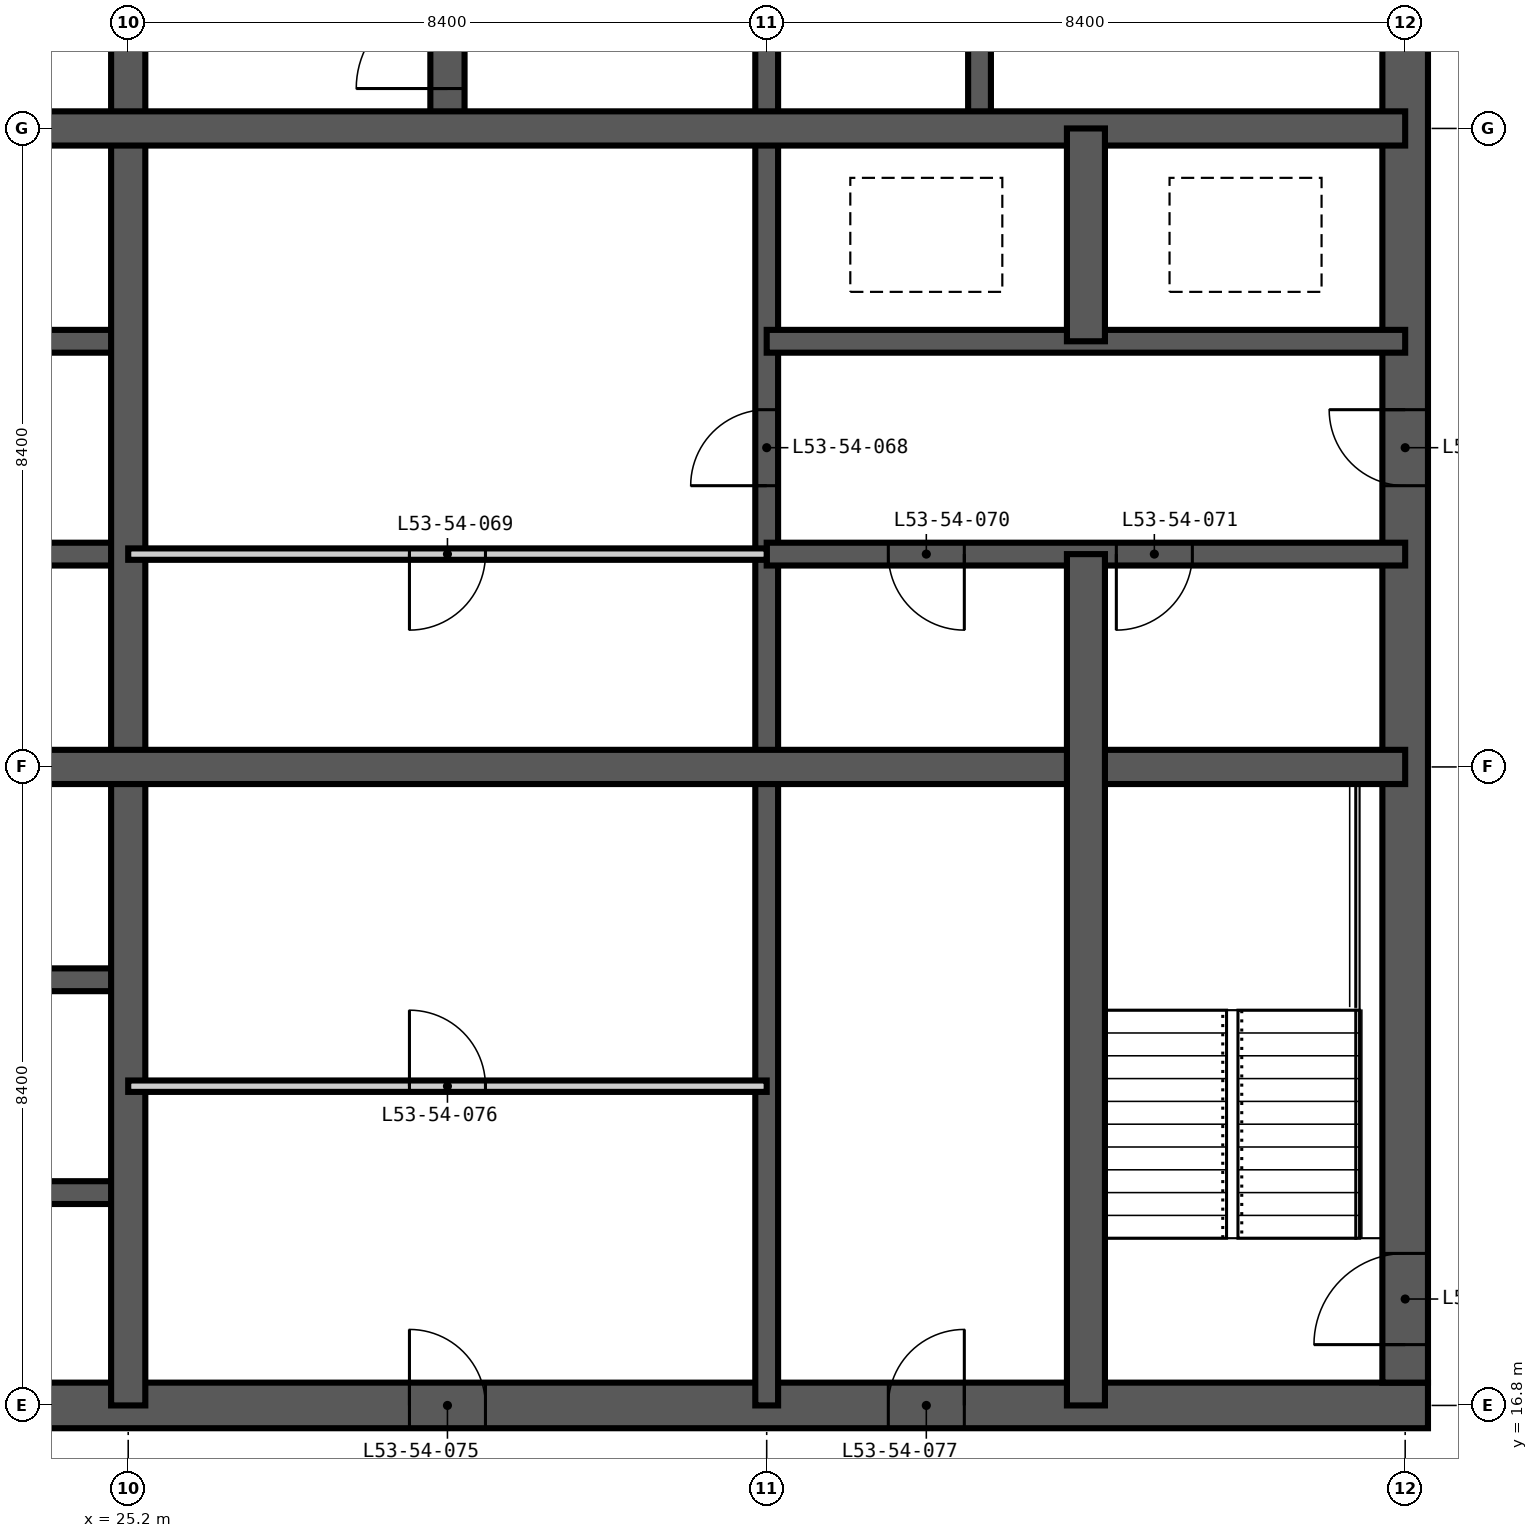
"""IFC4 building model, lengths in metres.
Left out: names, types, materials, properties, quantities, classifications, styles, units other than length and angle.
Written with IfcOpenShell. Run it as: python <this file> out.ifc"""

import sys

from ifc_helpers import new_model, si_unit, direction, frame, frame_2d, origin, place, context, subcontext, project, spatial, rectangle, extrude, element, fill, save


model = new_model("IFC4")
c1 = context("Model", 3, precision=1e-05, world=origin(), true_north=direction((0.0, 1.0)))
c2 = subcontext(c1, "Body", "Model", "MODEL_VIEW")
j1 = project(units=[si_unit("LENGTHUNIT", "METRE"), si_unit("PLANEANGLEUNIT", "RADIAN")], contexts=[c1])
p1 = place(None, origin())
s1 = spatial("IfcSite", under=j1, at=p1, CompositionType="ELEMENT")
p2 = place(p1, origin())
s2 = spatial("IfcBuilding", under=s1, at=p2, CompositionType="ELEMENT")
p3 = place(p2, frame((0.0, 0.0, 205.8)))
s3 = spatial("IfcBuildingStorey", under=s2, at=p3, CompositionType="ELEMENT", Elevation=205.8)
p4 = place(p3, frame((16.5, 16.8, -0.35), z_axis=(0.0, 0.0, 1.0), x_axis=(1.0, 0.0, 0.0)))
e1 = element("IfcWall", 1, at=p4, inside=s3, PredefinedType="SHEAR", context=c2, shape_type="SweptSolid", body=[
    extrude(rectangle(XDim=25.8, YDim=0.6, at=frame_2d((12.9, 0.0))), origin(), (0.0, 0.0, 1.0), 3.6),
])
p5 = place(p4, frame((12.4, 0.0, 0.35)))
e2 = element("IfcOpeningElement", 2, at=p5, cuts=e1, PredefinedType="OPENING", context=c2, shape_type="SweptSolid", body=[
    extrude(rectangle(XDim=1.0, YDim=2.1, at=frame_2d((0.5, 1.05))), frame((0.0, 0.31, 0.0), z_axis=(0.0, -1.0, 0.0), x_axis=(1.0, 0.0, 0.0)), (0.0, 0.0, 1.0), 0.62),
])
p6 = place(p4, frame((18.7, 0.0, 0.35)))
e3 = element("IfcOpeningElement", 3, at=p6, cuts=e1, PredefinedType="OPENING", context=c2, shape_type="SweptSolid", body=[
    extrude(rectangle(XDim=1.0, YDim=2.1, at=frame_2d((0.5, 1.05))), frame((0.0, 0.31, 0.0), z_axis=(0.0, -1.0, 0.0), x_axis=(1.0, 0.0, 0.0)), (0.0, 0.0, 1.0), 0.62),
])
p7 = place(p3, frame((42.0, 17.1, -0.35), z_axis=(0.0, 0.0, 1.0), x_axis=(0.0, 1.0, 0.0)))
e4 = element("IfcWall", 4, at=p7, inside=s3, PredefinedType="SHEAR", context=c2, shape_type="SweptSolid", body=[
    extrude(rectangle(XDim=24.6, YDim=0.6, at=frame_2d((12.3, 0.0))), origin(), (0.0, 0.0, 1.0), 3.6),
])
p8 = place(p7, frame((0.5, 0.0, 0.35)))
e5 = element("IfcOpeningElement", 5, at=p8, cuts=e4, PredefinedType="OPENING", context=c2, shape_type="SweptSolid", body=[
    extrude(rectangle(XDim=1.2, YDim=2.2, at=frame_2d((0.6, 1.1))), frame((0.0, 0.31, 0.0), z_axis=(0.0, -1.0, 0.0), x_axis=(1.0, 0.0, 0.0)), (0.0, 0.0, 1.0), 0.62),
])
p9 = place(p7, frame((11.8, 0.0, 0.35)))
e6 = element("IfcOpeningElement", 6, at=p9, cuts=e4, PredefinedType="OPENING", context=c2, shape_type="SweptSolid", body=[
    extrude(rectangle(XDim=1.0, YDim=2.1, at=frame_2d((0.5, 1.05))), frame((0.0, 0.31, 0.0), z_axis=(0.0, -1.0, 0.0), x_axis=(1.0, 0.0, 0.0)), (0.0, 0.0, 1.0), 0.62),
])
p10 = place(p7, frame((20.2, 0.0, 0.35)))
e7 = element("IfcOpeningElement", 7, at=p10, cuts=e4, PredefinedType="OPENING", context=c2, shape_type="SweptSolid", body=[
    extrude(rectangle(XDim=1.0, YDim=2.1, at=frame_2d((0.5, 1.05))), frame((0.0, 0.31, 0.0), z_axis=(0.0, -1.0, 0.0), x_axis=(1.0, 0.0, 0.0)), (0.0, 0.0, 1.0), 0.62),
])
p11 = place(p3, frame((33.6, 16.8, -0.35), z_axis=(0.0, 0.0, 1.0), x_axis=(0.0, 1.0, 0.0)))
e8 = element("IfcWall", 8, at=p11, inside=s3, PredefinedType="SHEAR", context=c2, shape_type="SweptSolid", body=[
    extrude(rectangle(XDim=25.2, YDim=0.3, at=frame_2d((12.6, 0.0))), origin(), (0.0, 0.0, 1.0), 3.6),
])
p12 = place(p11, frame((22.5, 0.0, 0.35)))
e9 = element("IfcOpeningElement", 9, at=p12, cuts=e8, PredefinedType="OPENING", context=c2, shape_type="SweptSolid", body=[
    extrude(rectangle(XDim=1.2, YDim=2.2, at=frame_2d((0.6, 1.1))), frame((0.0, 0.16, 0.0), z_axis=(0.0, -1.0, 0.0), x_axis=(1.0, 0.0, 0.0)), (0.0, 0.0, 1.0), 0.32),
])
p13 = place(p11, frame((18.3, 0.0, 0.35)))
e10 = element("IfcOpeningElement", 10, at=p13, cuts=e8, PredefinedType="OPENING", context=c2, shape_type="SweptSolid", body=[
    extrude(rectangle(XDim=1.2, YDim=2.2, at=frame_2d((0.6, 1.1))), frame((0.0, 0.16, 0.0), z_axis=(0.0, -1.0, 0.0), x_axis=(1.0, 0.0, 0.0)), (0.0, 0.0, 1.0), 0.32),
])
p14 = place(p11, frame((12.1, 0.0, 0.35)))
e11 = element("IfcOpeningElement", 11, at=p14, cuts=e8, PredefinedType="OPENING", context=c2, shape_type="SweptSolid", body=[
    extrude(rectangle(XDim=1.0, YDim=2.1, at=frame_2d((0.5, 1.05))), frame((0.0, 0.16, 0.0), z_axis=(0.0, -1.0, 0.0), x_axis=(1.0, 0.0, 0.0)), (0.0, 0.0, 1.0), 0.32),
])
p15 = place(p3, frame((36.4, 33.6, -0.35), z_axis=(0.0, 0.0, 1.0), x_axis=(0.0, 1.0, 0.0)))
e12 = element("IfcWall", 12, at=p15, inside=s3, PredefinedType="SHEAR", context=c2, shape_type="SweptSolid", body=[
    extrude(rectangle(XDim=8.4, YDim=0.3, at=frame_2d((4.2, 0.0))), origin(), (0.0, 0.0, 1.0), 3.6),
])
p16 = place(p3, frame((16.8, 19.6, -0.35), z_axis=(0.0, 0.0, 1.0), x_axis=(1.0, 0.0, 0.0)))
e13 = element("IfcWall", 13, at=p16, inside=s3, PredefinedType="SHEAR", context=c2, shape_type="SweptSolid", body=[
    extrude(rectangle(XDim=8.4, YDim=0.3, at=frame_2d((4.2, 0.0))), origin(), (0.0, 0.0, 1.0), 3.6),
])
p17 = place(p16, frame((1.6, 0.0, 0.35)))
e14 = element("IfcOpeningElement", 14, at=p17, cuts=e13, PredefinedType="OPENING", context=c2, shape_type="SweptSolid", body=[
    extrude(rectangle(XDim=1.0, YDim=2.1, at=frame_2d((0.5, 1.05))), frame((0.0, 0.16, 0.0), z_axis=(0.0, -1.0, 0.0), x_axis=(1.0, 0.0, 0.0)), (0.0, 0.0, 1.0), 0.32),
])
p18 = place(p16, frame((5.8, 0.0, 0.35)))
e15 = element("IfcOpeningElement", 15, at=p18, cuts=e13, PredefinedType="OPENING", context=c2, shape_type="SweptSolid", body=[
    extrude(rectangle(XDim=1.0, YDim=2.1, at=frame_2d((0.5, 1.05))), frame((0.0, 0.16, 0.0), z_axis=(0.0, -1.0, 0.0), x_axis=(1.0, 0.0, 0.0)), (0.0, 0.0, 1.0), 0.32),
])
p19 = place(p3, frame((16.8, 22.4, -0.35), z_axis=(0.0, 0.0, 1.0), x_axis=(1.0, 0.0, 0.0)))
e16 = element("IfcWall", 16, at=p19, inside=s3, PredefinedType="SHEAR", context=c2, shape_type="SweptSolid", body=[
    extrude(rectangle(XDim=8.4, YDim=0.3, at=frame_2d((4.2, 0.0))), origin(), (0.0, 0.0, 1.0), 3.6),
])
p20 = place(p19, frame((1.6, 0.0, 0.35)))
e17 = element("IfcOpeningElement", 17, at=p20, cuts=e16, PredefinedType="OPENING", context=c2, shape_type="SweptSolid", body=[
    extrude(rectangle(XDim=1.0, YDim=2.1, at=frame_2d((0.5, 1.05))), frame((0.0, 0.16, 0.0), z_axis=(0.0, -1.0, 0.0), x_axis=(1.0, 0.0, 0.0)), (0.0, 0.0, 1.0), 0.32),
])
p21 = place(p19, frame((5.8, 0.0, 0.35)))
e18 = element("IfcOpeningElement", 18, at=p21, cuts=e16, PredefinedType="OPENING", context=c2, shape_type="SweptSolid", body=[
    extrude(rectangle(XDim=1.0, YDim=2.1, at=frame_2d((0.5, 1.05))), frame((0.0, 0.16, 0.0), z_axis=(0.0, -1.0, 0.0), x_axis=(1.0, 0.0, 0.0)), (0.0, 0.0, 1.0), 0.32),
])
p22 = place(p3, frame((16.8, 28.0, -0.35), z_axis=(0.0, 0.0, 1.0), x_axis=(1.0, 0.0, 0.0)))
e19 = element("IfcWall", 19, at=p22, inside=s3, PredefinedType="SHEAR", context=c2, shape_type="SweptSolid", body=[
    extrude(rectangle(XDim=8.4, YDim=0.3, at=frame_2d((4.2, 0.0))), origin(), (0.0, 0.0, 1.0), 3.6),
])
p23 = place(p22, frame((1.55, 0.0, 0.35)))
e20 = element("IfcOpeningElement", 20, at=p23, cuts=e19, PredefinedType="OPENING", context=c2, shape_type="SweptSolid", body=[
    extrude(rectangle(XDim=1.1, YDim=2.2, at=frame_2d((0.55, 1.1))), frame((0.0, 0.16, 0.0), z_axis=(0.0, -1.0, 0.0), x_axis=(1.0, 0.0, 0.0)), (0.0, 0.0, 1.0), 0.32),
])
p24 = place(p22, frame((5.75, 0.0, 0.35)))
e21 = element("IfcOpeningElement", 21, at=p24, cuts=e19, PredefinedType="OPENING", context=c2, shape_type="SweptSolid", body=[
    extrude(rectangle(XDim=1.1, YDim=2.2, at=frame_2d((0.55, 1.1))), frame((0.0, 0.16, 0.0), z_axis=(0.0, -1.0, 0.0), x_axis=(1.0, 0.0, 0.0)), (0.0, 0.0, 1.0), 0.32),
])
p25 = place(p3, frame((33.6, 28.0, -0.35), z_axis=(0.0, 0.0, 1.0), x_axis=(1.0, 0.0, 0.0)))
e22 = element("IfcWall", 22, at=p25, inside=s3, PredefinedType="SHEAR", context=c2, shape_type="SweptSolid", body=[
    extrude(rectangle(XDim=8.4, YDim=0.3, at=frame_2d((4.2, 0.0))), origin(), (0.0, 0.0, 1.0), 3.6),
])
p26 = place(p25, frame((1.6, 0.0, 0.35)))
e23 = element("IfcOpeningElement", 23, at=p26, cuts=e22, PredefinedType="OPENING", context=c2, shape_type="SweptSolid", body=[
    extrude(rectangle(XDim=1.0, YDim=2.1, at=frame_2d((0.5, 1.05))), frame((0.0, 0.16, 0.0), z_axis=(0.0, -1.0, 0.0), x_axis=(1.0, 0.0, 0.0)), (0.0, 0.0, 1.0), 0.32),
])
p27 = place(p25, frame((4.6, 0.0, 0.35)))
e24 = element("IfcOpeningElement", 24, at=p27, cuts=e22, PredefinedType="OPENING", context=c2, shape_type="SweptSolid", body=[
    extrude(rectangle(XDim=1.0, YDim=2.1, at=frame_2d((0.5, 1.05))), frame((0.0, 0.16, 0.0), z_axis=(0.0, -1.0, 0.0), x_axis=(1.0, 0.0, 0.0)), (0.0, 0.0, 1.0), 0.32),
])
p28 = place(p3, frame((16.8, 30.8, -0.35), z_axis=(0.0, 0.0, 1.0), x_axis=(1.0, 0.0, 0.0)))
e25 = element("IfcWall", 25, at=p28, inside=s3, PredefinedType="SHEAR", context=c2, shape_type="SweptSolid", body=[
    extrude(rectangle(XDim=8.4, YDim=0.3, at=frame_2d((4.2, 0.0))), origin(), (0.0, 0.0, 1.0), 3.6),
])
p29 = place(p28, frame((1.55, 0.0, 0.35)))
e26 = element("IfcOpeningElement", 26, at=p29, cuts=e25, PredefinedType="OPENING", context=c2, shape_type="SweptSolid", body=[
    extrude(rectangle(XDim=1.1, YDim=2.2, at=frame_2d((0.55, 1.1))), frame((0.0, 0.16, 0.0), z_axis=(0.0, -1.0, 0.0), x_axis=(1.0, 0.0, 0.0)), (0.0, 0.0, 1.0), 0.32),
])
p30 = place(p28, frame((5.75, 0.0, 0.35)))
e27 = element("IfcOpeningElement", 27, at=p30, cuts=e25, PredefinedType="OPENING", context=c2, shape_type="SweptSolid", body=[
    extrude(rectangle(XDim=1.1, YDim=2.2, at=frame_2d((0.55, 1.1))), frame((0.0, 0.16, 0.0), z_axis=(0.0, -1.0, 0.0), x_axis=(1.0, 0.0, 0.0)), (0.0, 0.0, 1.0), 0.32),
])
p31 = place(p3, frame((33.6, 30.8, -0.35), z_axis=(0.0, 0.0, 1.0), x_axis=(1.0, 0.0, 0.0)))
e28 = element("IfcWall", 28, at=p31, inside=s3, PredefinedType="SHEAR", context=c2, shape_type="SweptSolid", body=[
    extrude(rectangle(XDim=8.4, YDim=0.3, at=frame_2d((4.2, 0.0))), origin(), (0.0, 0.0, 1.0), 3.6),
])
p32 = place(p3, frame((25.2, 16.8, -0.35), z_axis=(0.0, 0.0, 1.0), x_axis=(0.0, 1.0, 0.0)))
e29 = element("IfcWall", 29, at=p32, inside=s3, PredefinedType="SHEAR", context=c2, shape_type="SweptSolid", body=[
    extrude(rectangle(XDim=25.2, YDim=0.45, at=frame_2d((12.6, 0.0))), origin(), (0.0, 0.0, 1.0), 3.6),
])
p33 = place(p3, frame((29.4, 33.6, -0.35), z_axis=(0.0, 0.0, 1.0), x_axis=(0.0, 1.0, 0.0)))
e30 = element("IfcWall", 30, at=p33, inside=s3, PredefinedType="SHEAR", context=c2, shape_type="SweptSolid", body=[
    extrude(rectangle(XDim=8.4, YDim=0.45, at=frame_2d((4.2, 0.0))), origin(), (0.0, 0.0, 1.0), 3.6),
])
p34 = place(p33, frame((0.525, 0.0, 0.35)))
e31 = element("IfcOpeningElement", 31, at=p34, cuts=e30, PredefinedType="OPENING", context=c2, shape_type="SweptSolid", body=[
    extrude(rectangle(XDim=1.2, YDim=2.2, at=frame_2d((0.6, 1.1))), frame((0.0, 0.235, 0.0), z_axis=(0.0, -1.0, 0.0), x_axis=(1.0, 0.0, 0.0)), (0.0, 0.0, 1.0), 0.47),
])
for number, where, z_axis, x_axis in (
    (32, (16.8, 25.2, -0.35), (0.0, 0.0, 1.0), (1.0, 0.0, 0.0)),
    (33, (16.8, 33.6, -0.35), (0.0, 0.0, 1.0), (1.0, 0.0, 0.0)),
):
    element("IfcWall", number, at=place(p3, frame(where, z_axis=z_axis, x_axis=x_axis)), inside=s3, PredefinedType="SHEAR", context=c2, shape_type="SweptSolid", body=[
        extrude(rectangle(XDim=25.2, YDim=0.45, at=frame_2d((12.6, 0.0))), origin(), (0.0, 0.0, 1.0), 3.6),
    ])
p35 = place(p3, frame((37.8, 16.8, -0.35), z_axis=(0.0, 0.0, 1.0), x_axis=(0.0, 1.0, 0.0)))
e34 = element("IfcWall", 34, at=p35, inside=s3, PredefinedType="SHEAR", context=c2, shape_type="SweptSolid", body=[
    extrude(rectangle(XDim=11.2, YDim=0.5, at=frame_2d((5.6, 0.0))), origin(), (0.0, 0.0, 1.0), 3.6),
])
p36 = place(p3, frame((37.8, 30.8, -0.35), z_axis=(0.0, 0.0, 1.0), x_axis=(0.0, 1.0, 0.0)))
e35 = element("IfcWall", 35, at=p36, inside=s3, PredefinedType="SHEAR", context=c2, shape_type="SweptSolid", body=[
    extrude(rectangle(XDim=2.8, YDim=0.5, at=frame_2d((1.4, 0.0))), origin(), (0.0, 0.0, 1.0), 3.6),
])
p37 = place(p3, frame((25.2, 21.0, 0.0), z_axis=(0.0, 0.0, 1.0), x_axis=(1.0, 0.0, 0.0)))
e36 = element("IfcWall", 36, at=p37, inside=s3, PredefinedType="PARTITIONING", context=c2, shape_type="SweptSolid", body=[
    extrude(rectangle(XDim=8.4, YDim=0.15, at=frame_2d((4.2, 0.0))), origin(), (0.0, 0.0, 1.0), 3.25),
])
p38 = place(p37, frame((3.7, 0.0, 0.0)))
e37 = element("IfcOpeningElement", 37, at=p38, cuts=e36, PredefinedType="OPENING", context=c2, shape_type="SweptSolid", body=[
    extrude(rectangle(XDim=1.0, YDim=2.1, at=frame_2d((0.5, 1.05))), frame((0.0, 0.085, 0.0), z_axis=(0.0, -1.0, 0.0), x_axis=(1.0, 0.0, 0.0)), (0.0, 0.0, 1.0), 0.17),
])
p39 = place(p3, frame((25.2, 28.0, 0.0), z_axis=(0.0, 0.0, 1.0), x_axis=(1.0, 0.0, 0.0)))
e38 = element("IfcWall", 38, at=p39, inside=s3, PredefinedType="PARTITIONING", context=c2, shape_type="SweptSolid", body=[
    extrude(rectangle(XDim=8.4, YDim=0.15, at=frame_2d((4.2, 0.0))), origin(), (0.0, 0.0, 1.0), 3.25),
])
p40 = place(p39, frame((3.7, 0.0, 0.0)))
e39 = element("IfcOpeningElement", 39, at=p40, cuts=e38, PredefinedType="OPENING", context=c2, shape_type="SweptSolid", body=[
    extrude(rectangle(XDim=1.0, YDim=2.1, at=frame_2d((0.5, 1.05))), frame((0.0, 0.085, 0.0), z_axis=(0.0, -1.0, 0.0), x_axis=(1.0, 0.0, 0.0)), (0.0, 0.0, 1.0), 0.17),
])
p41 = place(p34, origin())
e40 = element("IfcDoor", 40, at=p41, inside=s3, OperationType="SINGLE_SWING_LEFT", PredefinedType="DOOR", context=c2, shape_type="SweptSolid", body=[
    extrude(rectangle(XDim=1.2, YDim=2.2, at=frame_2d((0.6, 1.1))), frame((0.0, 0.025, 0.0), z_axis=(0.0, -1.0, 0.0), x_axis=(1.0, 0.0, 0.0)), (0.0, 0.0, 1.0), 0.05),
])
fill(e31, e40)
p42 = place(p8, origin())
e41 = element("IfcDoor", 41, at=p42, inside=s3, OperationType="SINGLE_SWING_LEFT", PredefinedType="DOOR", context=c2, shape_type="SweptSolid", body=[
    extrude(rectangle(XDim=1.2, YDim=2.2, at=frame_2d((0.6, 1.1))), frame((0.0, 0.025, 0.0), z_axis=(0.0, -1.0, 0.0), x_axis=(1.0, 0.0, 0.0)), (0.0, 0.0, 1.0), 0.05),
])
fill(e5, e41)
p43 = place(p14, origin())
e42 = element("IfcDoor", 42, at=p43, inside=s3, OperationType="SINGLE_SWING_LEFT", PredefinedType="DOOR", context=c2, shape_type="SweptSolid", body=[
    extrude(rectangle(XDim=1.0, YDim=2.1, at=frame_2d((0.5, 1.05))), frame((0.0, 0.025, 0.0), z_axis=(0.0, -1.0, 0.0), x_axis=(1.0, 0.0, 0.0)), (0.0, 0.0, 1.0), 0.05),
])
fill(e11, e42)
p44 = place(p40, frame((1.0, 0.0, 0.0), z_axis=(0.0, 0.0, 1.0), x_axis=(-1.0, 0.0, 0.0)))
e43 = element("IfcDoor", 43, at=p44, inside=s3, OperationType="SINGLE_SWING_RIGHT", PredefinedType="DOOR", context=c2, shape_type="SweptSolid", body=[
    extrude(rectangle(XDim=1.0, YDim=2.1, at=frame_2d((0.5, 1.05))), frame((0.0, 0.025, 0.0), z_axis=(0.0, -1.0, 0.0), x_axis=(1.0, 0.0, 0.0)), (0.0, 0.0, 1.0), 0.05),
])
fill(e39, e43)
p45 = place(p26, frame((1.0, 0.0, 0.0), z_axis=(0.0, 0.0, 1.0), x_axis=(-1.0, 0.0, 0.0)))
e44 = element("IfcDoor", 44, at=p45, inside=s3, OperationType="SINGLE_SWING_LEFT", PredefinedType="DOOR", context=c2, shape_type="SweptSolid", body=[
    extrude(rectangle(XDim=1.0, YDim=2.1, at=frame_2d((0.5, 1.05))), frame((0.0, 0.025, 0.0), z_axis=(0.0, -1.0, 0.0), x_axis=(1.0, 0.0, 0.0)), (0.0, 0.0, 1.0), 0.05),
])
fill(e23, e44)
p46 = place(p27, frame((1.0, 0.0, 0.0), z_axis=(0.0, 0.0, 1.0), x_axis=(-1.0, 0.0, 0.0)))
e45 = element("IfcDoor", 45, at=p46, inside=s3, OperationType="SINGLE_SWING_RIGHT", PredefinedType="DOOR", context=c2, shape_type="SweptSolid", body=[
    extrude(rectangle(XDim=1.0, YDim=2.1, at=frame_2d((0.5, 1.05))), frame((0.0, 0.025, 0.0), z_axis=(0.0, -1.0, 0.0), x_axis=(1.0, 0.0, 0.0)), (0.0, 0.0, 1.0), 0.05),
])
fill(e24, e45)
p47 = place(p9, origin())
e46 = element("IfcDoor", 46, at=p47, inside=s3, OperationType="SINGLE_SWING_RIGHT", PredefinedType="DOOR", context=c2, shape_type="SweptSolid", body=[
    extrude(rectangle(XDim=1.0, YDim=2.1, at=frame_2d((0.5, 1.05))), frame((0.0, 0.025, 0.0), z_axis=(0.0, -1.0, 0.0), x_axis=(1.0, 0.0, 0.0)), (0.0, 0.0, 1.0), 0.05),
])
fill(e6, e46)
p48 = place(p5, origin())
e47 = element("IfcDoor", 47, at=p48, inside=s3, OperationType="SINGLE_SWING_LEFT", PredefinedType="DOOR", context=c2, shape_type="SweptSolid", body=[
    extrude(rectangle(XDim=1.0, YDim=2.1, at=frame_2d((0.5, 1.05))), frame((0.0, 0.025, 0.0), z_axis=(0.0, -1.0, 0.0), x_axis=(1.0, 0.0, 0.0)), (0.0, 0.0, 1.0), 0.05),
])
fill(e2, e47)
p49 = place(p38, origin())
e48 = element("IfcDoor", 48, at=p49, inside=s3, OperationType="SINGLE_SWING_LEFT", PredefinedType="DOOR", context=c2, shape_type="SweptSolid", body=[
    extrude(rectangle(XDim=1.0, YDim=2.1, at=frame_2d((0.5, 1.05))), frame((0.0, 0.025, 0.0), z_axis=(0.0, -1.0, 0.0), x_axis=(1.0, 0.0, 0.0)), (0.0, 0.0, 1.0), 0.05),
])
fill(e37, e48)
p50 = place(p6, origin())
e49 = element("IfcDoor", 49, at=p50, inside=s3, OperationType="SINGLE_SWING_RIGHT", PredefinedType="DOOR", context=c2, shape_type="SweptSolid", body=[
    extrude(rectangle(XDim=1.0, YDim=2.1, at=frame_2d((0.5, 1.05))), frame((0.0, 0.025, 0.0), z_axis=(0.0, -1.0, 0.0), x_axis=(1.0, 0.0, 0.0)), (0.0, 0.0, 1.0), 0.05),
])
fill(e3, e49)
save(model, sys.argv[1])
